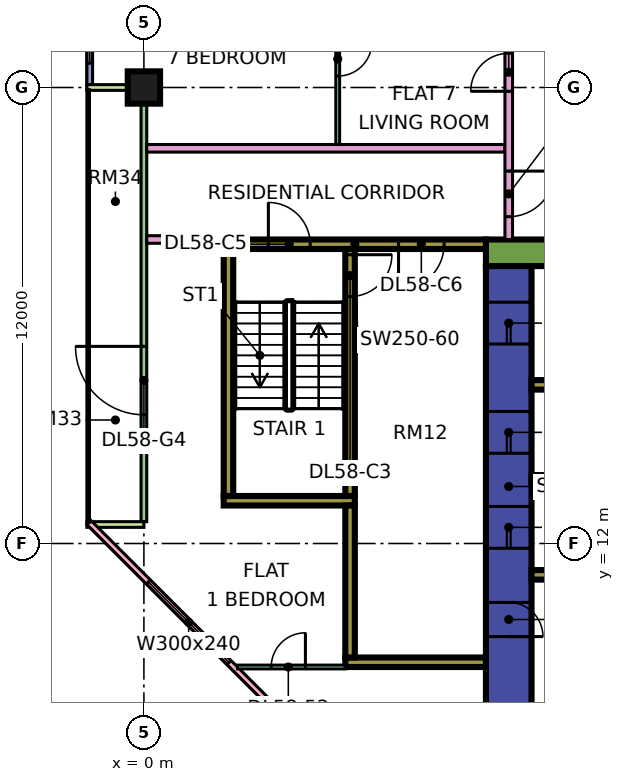
"""IFC4 building model, lengths in metres.
Left out: names, types, materials, properties, quantities, classifications, styles, units other than length and angle.
Written with IfcOpenShell. Run it as: python <this file> out.ifc"""

import sys

from ifc_helpers import new_model, si_unit, direction, frame, frame_2d, origin, origin_2d, place, context, subcontext, project, spatial, rectangle, extrude, element, fill, save


model = new_model("IFC4")
c1 = context("Model", 3, precision=1e-05, world=origin(), true_north=direction((0.0, 1.0)))
c2 = subcontext(c1, "Body", "Model", "MODEL_VIEW")
j1 = project(units=[si_unit("LENGTHUNIT", "METRE"), si_unit("PLANEANGLEUNIT", "RADIAN")], contexts=[c1])
p1 = place(None, origin())
s1 = spatial("IfcSite", under=j1, at=p1, CompositionType="ELEMENT")
p2 = place(p1, origin())
s2 = spatial("IfcBuilding", under=s1, at=p2, CompositionType="ELEMENT")
p3 = place(p2, frame((0.0, 0.0, 245.4)))
s3 = spatial("IfcBuildingStorey", under=s2, at=p3, CompositionType="ELEMENT", Elevation=245.4)
p4 = place(p3, frame((0.0, 24.0, 0.0), z_axis=(0.0, 0.0, 1.0), x_axis=(1.0, 0.0, 0.0)))
e1 = element("IfcColumn", 1, at=p4, inside=s3, PredefinedType="COLUMN", context=c2, shape_type="SweptSolid", body=[
    extrude(rectangle(XDim=0.85, YDim=0.85, at=origin_2d()), origin(), (0.0, 0.0, 1.0), 3.75),
])
p5 = place(p3, frame((9.0, 19.65, 0.0), z_axis=(0.0, 0.0, 1.0), x_axis=(1.0, 0.0, 0.0)))
e2 = element("IfcWall", 2, at=p5, inside=s3, PredefinedType="SHEAR", context=c2, shape_type="SweptSolid", body=[
    extrude(rectangle(XDim=25.0, YDim=0.7, at=frame_2d((12.5, 0.0))), origin(), (0.0, 0.0, 1.0), 3.75),
])
p6 = place(p5, frame((19.1, 0.0, 0.0)))
e3 = element("IfcOpeningElement", 3, at=p6, cuts=e2, PredefinedType="OPENING", context=c2, shape_type="SweptSolid", body=[
    extrude(rectangle(XDim=1.8, YDim=2.4, at=frame_2d((0.9, 1.2))), frame((0.0, 0.36, 0.0), z_axis=(0.0, -1.0, 0.0), x_axis=(1.0, 0.0, 0.0)), (0.0, 0.0, 1.0), 0.72),
])
p7 = place(p3, frame((9.6, 7.7, 0.0), z_axis=(0.0, 0.0, 1.0), x_axis=(0.0, 1.0, 0.0)))
e4 = element("IfcWall", 4, at=p7, inside=s3, PredefinedType="SHEAR", context=c2, shape_type="SweptSolid", body=[
    extrude(rectangle(XDim=11.6, YDim=1.2, at=frame_2d((5.8, 0.0))), origin(), (0.0, 0.0, 1.0), 3.75),
])
p8 = place(p7, frame((4.175, 0.0, 0.0)))
e5 = element("IfcOpeningElement", 5, at=p8, cuts=e4, PredefinedType="OPENING", context=c2, shape_type="SweptSolid", body=[
    extrude(rectangle(XDim=1.1, YDim=2.2, at=frame_2d((0.55, 1.1))), frame((0.0, 0.61, 0.0), z_axis=(0.0, -1.0, 0.0), x_axis=(1.0, 0.0, 0.0)), (0.0, 0.0, 1.0), 1.22),
])
p9 = place(p7, frame((6.675, 0.0, 0.0)))
e6 = element("IfcOpeningElement", 6, at=p9, cuts=e4, PredefinedType="OPENING", context=c2, shape_type="SweptSolid", body=[
    extrude(rectangle(XDim=1.1, YDim=2.2, at=frame_2d((0.55, 1.1))), frame((0.0, 0.61, 0.0), z_axis=(0.0, -1.0, 0.0), x_axis=(1.0, 0.0, 0.0)), (0.0, 0.0, 1.0), 1.22),
])
p10 = place(p7, frame((9.55, 0.0, 0.0)))
e7 = element("IfcOpeningElement", 7, at=p10, cuts=e4, PredefinedType="OPENING", context=c2, shape_type="SweptSolid", body=[
    extrude(rectangle(XDim=1.1, YDim=2.2, at=frame_2d((0.55, 1.1))), frame((0.0, 0.61, 0.0), z_axis=(0.0, -1.0, 0.0), x_axis=(1.0, 0.0, 0.0)), (0.0, 0.0, 1.0), 1.22),
])
p11 = place(p7, frame((1.85, 0.0, 0.0)))
e8 = element("IfcOpeningElement", 8, at=p11, cuts=e4, PredefinedType="OPENING", context=c2, shape_type="SweptSolid", body=[
    extrude(rectangle(XDim=0.9, YDim=2.1, at=frame_2d((0.45, 1.05))), frame((0.0, 0.61, 0.0), z_axis=(0.0, -1.0, 0.0), x_axis=(1.0, 0.0, 0.0)), (0.0, 0.0, 1.0), 1.22),
])
for number, where, z_axis, x_axis in (
    (9, (10.2, 11.175, 0.0), (0.0, 0.0, 1.0), (1.0, 0.0, 0.0)),
    (10, (10.2, 13.675, 0.0), (0.0, 0.0, 1.0), (1.0, 0.0, 0.0)),
    (11, (10.2, 16.175, 0.0), (0.0, 0.0, 1.0), (1.0, 0.0, 0.0)),
):
    element("IfcWall", number, at=place(p3, frame(where, z_axis=z_axis, x_axis=x_axis)), inside=s3, PredefinedType="SHEAR", context=c2, shape_type="SweptSolid", body=[
        extrude(rectangle(XDim=3.0, YDim=0.25, at=frame_2d((1.5, 0.0))), origin(), (0.0, 0.0, 1.0), 3.75),
    ])
p12 = place(p3, frame((2.1, 19.875, 0.0), z_axis=(0.0, 0.0, 1.0), x_axis=(1.0, 0.0, 0.0)))
e12 = element("IfcWall", 12, at=p12, inside=s3, PredefinedType="SHEAR", context=c2, shape_type="SweptSolid", body=[
    extrude(rectangle(XDim=6.9, YDim=0.25, at=frame_2d((3.45, 0.0))), origin(), (0.0, 0.0, 1.0), 3.75),
])
p13 = place(p12, frame((1.175, 0.0, 0.0)))
e13 = element("IfcOpeningElement", 13, at=p13, cuts=e12, PredefinedType="OPENING", context=c2, shape_type="SweptSolid", body=[
    extrude(rectangle(XDim=1.1, YDim=2.2, at=frame_2d((0.55, 1.1))), frame((0.0, 0.135, 0.0), z_axis=(0.0, -1.0, 0.0), x_axis=(1.0, 0.0, 0.0)), (0.0, 0.0, 1.0), 0.27),
])
p14 = place(p12, frame((4.6, 0.0, 0.0)))
e14 = element("IfcOpeningElement", 14, at=p14, cuts=e12, PredefinedType="OPENING", context=c2, shape_type="SweptSolid", body=[
    extrude(rectangle(XDim=1.2, YDim=2.2, at=frame_2d((0.6, 1.1))), frame((0.0, 0.135, 0.0), z_axis=(0.0, -1.0, 0.0), x_axis=(1.0, 0.0, 0.0)), (0.0, 0.0, 1.0), 0.27),
])
p15 = place(p3, frame((2.1, 13.125, 0.0), z_axis=(0.0, 0.0, 1.0), x_axis=(1.0, 0.0, 0.0)))
e15 = element("IfcWall", 15, at=p15, inside=s3, PredefinedType="SHEAR", context=c2, shape_type="SweptSolid", body=[
    extrude(rectangle(XDim=3.45, YDim=0.25, at=frame_2d((1.725, 0.0))), origin(), (0.0, 0.0, 1.0), 3.75),
])
p16 = place(p3, frame((2.225, 13.25, 0.0), z_axis=(0.0, 0.0, 1.0), x_axis=(0.0, 1.0, 0.0)))
e16 = element("IfcWall", 16, at=p16, inside=s3, PredefinedType="SHEAR", context=c2, shape_type="SweptSolid", body=[
    extrude(rectangle(XDim=6.5, YDim=0.25, at=frame_2d((3.25, 0.0))), origin(), (0.0, 0.0, 1.0), 3.75),
])
p17 = place(p3, frame((5.425, 13.25, 0.0), z_axis=(0.0, 0.0, 1.0), x_axis=(0.0, 1.0, 0.0)))
e17 = element("IfcWall", 17, at=p17, inside=s3, PredefinedType="SHEAR", context=c2, shape_type="SweptSolid", body=[
    extrude(rectangle(XDim=6.5, YDim=0.25, at=frame_2d((3.25, 0.0))), origin(), (0.0, 0.0, 1.0), 3.75),
])
p18 = place(p17, frame((5.25, 0.0, 0.0)))
e18 = element("IfcOpeningElement", 18, at=p18, cuts=e17, PredefinedType="OPENING", context=c2, shape_type="SweptSolid", body=[
    extrude(rectangle(XDim=1.1, YDim=2.2, at=frame_2d((0.55, 1.1))), frame((0.0, 0.135, 0.0), z_axis=(0.0, -1.0, 0.0), x_axis=(1.0, 0.0, 0.0)), (0.0, 0.0, 1.0), 0.27),
])
p19 = place(p3, frame((5.3, 8.875, 0.0), z_axis=(0.0, 0.0, 1.0), x_axis=(1.0, 0.0, 0.0)))
e19 = element("IfcWall", 19, at=p19, inside=s3, PredefinedType="SHEAR", context=c2, shape_type="SweptSolid", body=[
    extrude(rectangle(XDim=3.7, YDim=0.25, at=frame_2d((1.85, 0.0))), origin(), (0.0, 0.0, 1.0), 3.75),
])
p20 = place(p3, frame((5.425, 9.0, 0.0), z_axis=(0.0, 0.0, 1.0), x_axis=(0.0, 1.0, 0.0)))
e20 = element("IfcWall", 20, at=p20, inside=s3, PredefinedType="SHEAR", context=c2, shape_type="SweptSolid", body=[
    extrude(rectangle(XDim=4.0, YDim=0.25, at=frame_2d((2.0, 0.0))), origin(), (0.0, 0.0, 1.0), 3.75),
])
p21 = place(p3, frame((-1.425, 35.925, 0.0), z_axis=(0.0, 0.0, 1.0), x_axis=(0.0, -1.0, 0.0)))
e21 = element("IfcWall", 21, at=p21, inside=s3, PredefinedType="SOLIDWALL", context=c2, shape_type="SweptSolid", body=[
    extrude(rectangle(XDim=11.85, YDim=0.15, at=frame_2d((5.925, 0.0))), origin(), (0.0, 0.0, 1.0), 3.35),
])
p22 = place(p21, frame((0.562, 0.0, 0.45)))
e22 = element("IfcOpeningElement", 22, at=p22, cuts=e21, PredefinedType="OPENING", context=c2, shape_type="SweptSolid", body=[
    extrude(rectangle(XDim=1.8, YDim=2.4, at=frame_2d((0.9, 1.2))), frame((0.0, 0.085, 0.0), z_axis=(0.0, -1.0, 0.0), x_axis=(1.0, 0.0, 0.0)), (0.0, 0.0, 1.0), 0.17),
])
p23 = place(p21, frame((3.525, 0.0, 0.45)))
e23 = element("IfcOpeningElement", 23, at=p23, cuts=e21, PredefinedType="OPENING", context=c2, shape_type="SweptSolid", body=[
    extrude(rectangle(XDim=1.8, YDim=2.4, at=frame_2d((0.9, 1.2))), frame((0.0, 0.085, 0.0), z_axis=(0.0, -1.0, 0.0), x_axis=(1.0, 0.0, 0.0)), (0.0, 0.0, 1.0), 0.17),
])
p24 = place(p21, frame((6.525, 0.0, 0.45)))
e24 = element("IfcOpeningElement", 24, at=p24, cuts=e21, PredefinedType="OPENING", context=c2, shape_type="SweptSolid", body=[
    extrude(rectangle(XDim=1.8, YDim=2.4, at=frame_2d((0.9, 1.2))), frame((0.0, 0.085, 0.0), z_axis=(0.0, -1.0, 0.0), x_axis=(1.0, 0.0, 0.0)), (0.0, 0.0, 1.0), 0.17),
])
p25 = place(p21, frame((9.488, 0.0, 0.45)))
e25 = element("IfcOpeningElement", 25, at=p25, cuts=e21, PredefinedType="OPENING", context=c2, shape_type="SweptSolid", body=[
    extrude(rectangle(XDim=1.8, YDim=2.4, at=frame_2d((0.9, 1.2))), frame((0.0, 0.085, 0.0), z_axis=(0.0, -1.0, 0.0), x_axis=(1.0, 0.0, 0.0)), (0.0, 0.0, 1.0), 0.17),
])
p26 = place(p3, frame((0.0, 23.925, 0.0), z_axis=(0.0, 0.0, 1.0), x_axis=(0.0, -1.0, 0.0)))
e26 = element("IfcWall", 26, at=p26, inside=s3, PredefinedType="SOLIDWALL", context=c2, shape_type="SweptSolid", body=[
    extrude(rectangle(XDim=11.35, YDim=0.15, at=frame_2d((5.675, 0.0))), origin(), (0.0, 0.0, 1.0), 3.35),
])
p27 = place(p26, frame((6.738, 0.0, 0.0)))
e27 = element("IfcOpeningElement", 27, at=p27, cuts=e26, PredefinedType="OPENING", context=c2, shape_type="SweptSolid", body=[
    extrude(rectangle(XDim=1.8, YDim=2.4, at=frame_2d((0.9, 1.2))), frame((0.0, 0.085, 0.0), z_axis=(0.0, -1.0, 0.0), x_axis=(1.0, 0.0, 0.0)), (0.0, 0.0, 1.0), 0.17),
])
for number, where, z_axis, x_axis in (
    (28, (-1.5, 24.0, 0.0), (0.0, 0.0, 1.0), (1.0, 0.0, 0.0)),
    (29, (-1.5, 12.5, 0.0), (0.0, 0.0, 1.0), (1.0, 0.0, 0.0)),
):
    element("IfcWall", number, at=place(p3, frame(where, z_axis=z_axis, x_axis=x_axis)), inside=s3, PredefinedType="SOLIDWALL", context=c2, shape_type="SweptSolid", body=[
        extrude(rectangle(XDim=1.5, YDim=0.15, at=frame_2d((0.75, 0.0))), origin(), (0.0, 0.0, 1.0), 3.35),
    ])
p28 = place(p3, frame((-1.447, 12.553, 0.0), z_axis=(0.0, 0.0, 1.0), x_axis=(0.707106781187, -0.707106781187, 0.0)))
e30 = element("IfcWall", 30, at=p28, inside=s3, PredefinedType="SOLIDWALL", context=c2, shape_type="SweptSolid", body=[
    extrude(rectangle(XDim=19.799, YDim=0.15, at=frame_2d((9.899, 0.0))), origin(), (0.0, 0.0, 1.0), 3.35),
])
p29 = place(p28, frame((2.212, 0.0, 0.45)))
e31 = element("IfcOpeningElement", 31, at=p29, cuts=e30, PredefinedType="OPENING", context=c2, shape_type="SweptSolid", body=[
    extrude(rectangle(XDim=3.0, YDim=2.4, at=frame_2d((1.5, 1.2))), frame((0.0, 0.085, 0.0), z_axis=(0.0, -1.0, 0.0), x_axis=(1.0, 0.0, 0.0)), (0.0, 0.0, 1.0), 0.17),
])
p30 = place(p28, frame((10.216, 0.0, 0.45)))
e32 = element("IfcOpeningElement", 32, at=p30, cuts=e30, PredefinedType="OPENING", context=c2, shape_type="SweptSolid", body=[
    extrude(rectangle(XDim=3.0, YDim=2.4, at=frame_2d((1.5, 1.2))), frame((0.0, 0.085, 0.0), z_axis=(0.0, -1.0, 0.0), x_axis=(1.0, 0.0, 0.0)), (0.0, 0.0, 1.0), 0.17),
])
p31 = place(p3, frame((0.074, 20.0, 0.0), z_axis=(0.0, 0.0, 1.0), x_axis=(1.0, 0.0, 0.0)))
e33 = element("IfcWall", 33, at=p31, inside=s3, PredefinedType="PARTITIONING", context=c2, shape_type="SweptSolid", body=[
    extrude(rectangle(XDim=2.026, YDim=0.2, at=frame_2d((1.013, 0.0))), origin(), (0.0, 0.0, 1.0), 3.35),
])
p32 = place(p3, frame((0.074, 22.4, 0.0), z_axis=(0.0, 0.0, 1.0), x_axis=(1.0, 0.0, 0.0)))
e34 = element("IfcWall", 34, at=p32, inside=s3, PredefinedType="PARTITIONING", context=c2, shape_type="SweptSolid", body=[
    extrude(rectangle(XDim=9.426, YDim=0.2, at=frame_2d((4.713, 0.0))), origin(), (0.0, 0.0, 1.0), 3.35),
])
p33 = place(p3, frame((2.461, 8.75, 0.0), z_axis=(0.0, 0.0, 1.0), x_axis=(1.0, 0.0, 0.0)))
e35 = element("IfcWall", 35, at=p33, inside=s3, PredefinedType="PARTITIONING", context=c2, shape_type="SweptSolid", body=[
    extrude(rectangle(XDim=2.839, YDim=0.1, at=frame_2d((1.419, 0.0))), origin(), (0.0, 0.0, 1.0), 3.35),
])
p34 = place(p33, frame((0.889, 0.0, 0.0)))
e36 = element("IfcOpeningElement", 36, at=p34, cuts=e35, PredefinedType="OPENING", context=c2, shape_type="SweptSolid", body=[
    extrude(rectangle(XDim=0.9, YDim=2.1, at=frame_2d((0.45, 1.05))), frame((0.0, 0.06, 0.0), z_axis=(0.0, -1.0, 0.0), x_axis=(1.0, 0.0, 0.0)), (0.0, 0.0, 1.0), 0.12),
])
p35 = place(p3, frame((5.1, 22.5, 0.0), z_axis=(0.0, 0.0, 1.0), x_axis=(0.0, 1.0, 0.0)))
e37 = element("IfcWall", 37, at=p35, inside=s3, PredefinedType="PARTITIONING", context=c2, shape_type="SweptSolid", body=[
    extrude(rectangle(XDim=10.55, YDim=0.1, at=frame_2d((5.275, 0.0))), origin(), (0.0, 0.0, 1.0), 3.35),
])
p36 = place(p35, frame((1.8, 0.0, 0.0)))
e38 = element("IfcOpeningElement", 38, at=p36, cuts=e37, PredefinedType="OPENING", context=c2, shape_type="SweptSolid", body=[
    extrude(rectangle(XDim=0.9, YDim=2.1, at=frame_2d((0.45, 1.05))), frame((0.0, 0.06, 0.0), z_axis=(0.0, -1.0, 0.0), x_axis=(1.0, 0.0, 0.0)), (0.0, 0.0, 1.0), 0.12),
])
p37 = place(p35, frame((5.55, 0.0, 0.0)))
e39 = element("IfcOpeningElement", 39, at=p37, cuts=e37, PredefinedType="OPENING", context=c2, shape_type="SweptSolid", body=[
    extrude(rectangle(XDim=0.9, YDim=2.1, at=frame_2d((0.45, 1.05))), frame((0.0, 0.06, 0.0), z_axis=(0.0, -1.0, 0.0), x_axis=(1.0, 0.0, 0.0)), (0.0, 0.0, 1.0), 0.12),
])
p38 = place(p35, frame((8.55, 0.0, 0.0)))
e40 = element("IfcOpeningElement", 40, at=p38, cuts=e37, PredefinedType="OPENING", context=c2, shape_type="SweptSolid", body=[
    extrude(rectangle(XDim=0.9, YDim=2.1, at=frame_2d((0.45, 1.05))), frame((0.0, 0.06, 0.0), z_axis=(0.0, -1.0, 0.0), x_axis=(1.0, 0.0, 0.0)), (0.0, 0.0, 1.0), 0.12),
])
p39 = place(p3, frame((9.6, 20.0, 0.0), z_axis=(0.0, 0.0, 1.0), x_axis=(0.0, 1.0, 0.0)))
e41 = element("IfcWall", 41, at=p39, inside=s3, PredefinedType="PARTITIONING", context=c2, shape_type="SweptSolid", body=[
    extrude(rectangle(XDim=44.35, YDim=0.2, at=frame_2d((22.175, 0.0))), origin(), (0.0, 0.0, 1.0), 3.35),
])
p40 = place(p39, frame((28.8, 0.0, 0.0)))
e42 = element("IfcOpeningElement", 42, at=p40, cuts=e41, PredefinedType="OPENING", context=c2, shape_type="SweptSolid", body=[
    extrude(rectangle(XDim=1.0, YDim=2.1, at=frame_2d((0.5, 1.05))), frame((0.0, 0.11, 0.0), z_axis=(0.0, -1.0, 0.0), x_axis=(1.0, 0.0, 0.0)), (0.0, 0.0, 1.0), 0.22),
])
p41 = place(p39, frame((0.6, 0.0, 0.0)))
e43 = element("IfcOpeningElement", 43, at=p41, cuts=e41, PredefinedType="OPENING", context=c2, shape_type="SweptSolid", body=[
    extrude(rectangle(XDim=1.2, YDim=2.1, at=frame_2d((0.6, 1.05))), frame((0.0, 0.11, 0.0), z_axis=(0.0, -1.0, 0.0), x_axis=(1.0, 0.0, 0.0)), (0.0, 0.0, 1.0), 0.22),
])
p42 = place(p39, frame((3.9, 0.0, 0.0)))
e44 = element("IfcOpeningElement", 44, at=p42, cuts=e41, PredefinedType="OPENING", context=c2, shape_type="SweptSolid", body=[
    extrude(rectangle(XDim=1.0, YDim=2.1, at=frame_2d((0.5, 1.05))), frame((0.0, 0.11, 0.0), z_axis=(0.0, -1.0, 0.0), x_axis=(1.0, 0.0, 0.0)), (0.0, 0.0, 1.0), 0.22),
])
p43 = place(p25, origin())
e45 = element("IfcWindow", 45, at=p43, inside=s3, PartitioningType="SINGLE_PANEL", PredefinedType="WINDOW", context=c2, shape_type="SweptSolid", body=[
    extrude(rectangle(XDim=1.8, YDim=2.4, at=frame_2d((0.9, 1.2))), frame((0.0, 0.03, 0.0), z_axis=(0.0, -1.0, 0.0), x_axis=(1.0, 0.0, 0.0)), (0.0, 0.0, 1.0), 0.06),
])
fill(e25, e45)
p44 = place(p27, frame((1.8, 0.0, 0.0), z_axis=(0.0, 0.0, 1.0), x_axis=(-1.0, 0.0, 0.0)))
e46 = element("IfcDoor", 46, at=p44, inside=s3, OperationType="DOUBLE_DOOR_SINGLE_SWING", PredefinedType="DOOR", context=c2, shape_type="SweptSolid", body=[
    extrude(rectangle(XDim=1.8, YDim=2.4, at=frame_2d((0.9, 1.2))), frame((0.0, 0.025, 0.0), z_axis=(0.0, -1.0, 0.0), x_axis=(1.0, 0.0, 0.0)), (0.0, 0.0, 1.0), 0.05),
])
fill(e27, e46)
p45 = place(p29, origin())
e47 = element("IfcWindow", 47, at=p45, inside=s3, PartitioningType="SINGLE_PANEL", PredefinedType="WINDOW", context=c2, shape_type="SweptSolid", body=[
    extrude(rectangle(XDim=3.0, YDim=2.4, at=frame_2d((1.5, 1.2))), frame((0.0, 0.03, 0.0), z_axis=(0.0, -1.0, 0.0), x_axis=(1.0, 0.0, 0.0)), (0.0, 0.0, 1.0), 0.06),
])
fill(e31, e47)
p46 = place(p8, origin())
e48 = element("IfcDoor", 48, at=p46, inside=s3, OperationType="DOUBLE_DOOR_SLIDING", PredefinedType="DOOR", context=c2, shape_type="SweptSolid", body=[
    extrude(rectangle(XDim=1.1, YDim=2.2, at=frame_2d((0.55, 1.1))), frame((0.0, 0.025, 0.0), z_axis=(0.0, -1.0, 0.0), x_axis=(1.0, 0.0, 0.0)), (0.0, 0.0, 1.0), 0.05),
])
fill(e5, e48)
p47 = place(p9, origin())
e49 = element("IfcDoor", 49, at=p47, inside=s3, OperationType="DOUBLE_DOOR_SLIDING", PredefinedType="DOOR", context=c2, shape_type="SweptSolid", body=[
    extrude(rectangle(XDim=1.1, YDim=2.2, at=frame_2d((0.55, 1.1))), frame((0.0, 0.025, 0.0), z_axis=(0.0, -1.0, 0.0), x_axis=(1.0, 0.0, 0.0)), (0.0, 0.0, 1.0), 0.05),
])
fill(e6, e49)
p48 = place(p10, origin())
e50 = element("IfcDoor", 50, at=p48, inside=s3, OperationType="DOUBLE_DOOR_SLIDING", PredefinedType="DOOR", context=c2, shape_type="SweptSolid", body=[
    extrude(rectangle(XDim=1.1, YDim=2.2, at=frame_2d((0.55, 1.1))), frame((0.0, 0.025, 0.0), z_axis=(0.0, -1.0, 0.0), x_axis=(1.0, 0.0, 0.0)), (0.0, 0.0, 1.0), 0.05),
])
fill(e7, e50)
p49 = place(p18, origin())
e51 = element("IfcDoor", 51, at=p49, inside=s3, OperationType="SINGLE_SWING_RIGHT", PredefinedType="DOOR", context=c2, shape_type="SweptSolid", body=[
    extrude(rectangle(XDim=1.1, YDim=2.2, at=frame_2d((0.55, 1.1))), frame((0.0, 0.025, 0.0), z_axis=(0.0, -1.0, 0.0), x_axis=(1.0, 0.0, 0.0)), (0.0, 0.0, 1.0), 0.05),
])
fill(e18, e51)
p50 = place(p11, frame((0.9, 0.0, 0.0), z_axis=(0.0, 0.0, 1.0), x_axis=(-1.0, 0.0, 0.0)))
e52 = element("IfcDoor", 52, at=p50, inside=s3, OperationType="SINGLE_SWING_LEFT", PredefinedType="DOOR", context=c2, shape_type="SweptSolid", body=[
    extrude(rectangle(XDim=0.9, YDim=2.1, at=frame_2d((0.45, 1.05))), frame((0.0, 0.025, 0.0), z_axis=(0.0, -1.0, 0.0), x_axis=(1.0, 0.0, 0.0)), (0.0, 0.0, 1.0), 0.05),
])
fill(e8, e52)
p51 = place(p13, origin())
e53 = element("IfcDoor", 53, at=p51, inside=s3, OperationType="SINGLE_SWING_LEFT", PredefinedType="DOOR", context=c2, shape_type="SweptSolid", body=[
    extrude(rectangle(XDim=1.1, YDim=2.2, at=frame_2d((0.55, 1.1))), frame((0.0, 0.025, 0.0), z_axis=(0.0, -1.0, 0.0), x_axis=(1.0, 0.0, 0.0)), (0.0, 0.0, 1.0), 0.05),
])
fill(e13, e53)
p52 = place(p14, frame((1.2, 0.0, 0.0), z_axis=(0.0, 0.0, 1.0), x_axis=(-1.0, 0.0, 0.0)))
e54 = element("IfcDoor", 54, at=p52, inside=s3, OperationType="SINGLE_SWING_LEFT", PredefinedType="DOOR", context=c2, shape_type="SweptSolid", body=[
    extrude(rectangle(XDim=1.2, YDim=2.2, at=frame_2d((0.6, 1.1))), frame((0.0, 0.025, 0.0), z_axis=(0.0, -1.0, 0.0), x_axis=(1.0, 0.0, 0.0)), (0.0, 0.0, 1.0), 0.05),
])
fill(e14, e54)
p53 = place(p41, origin())
e55 = element("IfcDoor", 55, at=p53, inside=s3, OperationType="SINGLE_SWING_RIGHT", PredefinedType="DOOR", context=c2, shape_type="SweptSolid", body=[
    extrude(rectangle(XDim=1.2, YDim=2.1, at=frame_2d((0.6, 1.05))), frame((0.0, 0.025, 0.0), z_axis=(0.0, -1.0, 0.0), x_axis=(1.0, 0.0, 0.0)), (0.0, 0.0, 1.0), 0.05),
])
fill(e43, e55)
p54 = place(p34, frame((0.9, 0.0, 0.0), z_axis=(0.0, 0.0, 1.0), x_axis=(-1.0, 0.0, 0.0)))
e56 = element("IfcDoor", 56, at=p54, inside=s3, OperationType="SINGLE_SWING_RIGHT", PredefinedType="DOOR", context=c2, shape_type="SweptSolid", body=[
    extrude(rectangle(XDim=0.9, YDim=2.1, at=frame_2d((0.45, 1.05))), frame((0.0, 0.025, 0.0), z_axis=(0.0, -1.0, 0.0), x_axis=(1.0, 0.0, 0.0)), (0.0, 0.0, 1.0), 0.05),
])
fill(e36, e56)
p55 = place(p36, origin())
e57 = element("IfcDoor", 57, at=p55, inside=s3, OperationType="SINGLE_SWING_RIGHT", PredefinedType="DOOR", context=c2, shape_type="SweptSolid", body=[
    extrude(rectangle(XDim=0.9, YDim=2.1, at=frame_2d((0.45, 1.05))), frame((0.0, 0.025, 0.0), z_axis=(0.0, -1.0, 0.0), x_axis=(1.0, 0.0, 0.0)), (0.0, 0.0, 1.0), 0.05),
])
fill(e38, e57)
p56 = place(p42, origin())
e58 = element("IfcDoor", 58, at=p56, inside=s3, OperationType="SINGLE_SWING_LEFT", PredefinedType="DOOR", context=c2, shape_type="SweptSolid", body=[
    extrude(rectangle(XDim=1.0, YDim=2.1, at=frame_2d((0.5, 1.05))), frame((0.0, 0.025, 0.0), z_axis=(0.0, -1.0, 0.0), x_axis=(1.0, 0.0, 0.0)), (0.0, 0.0, 1.0), 0.05),
])
fill(e44, e58)
save(model, sys.argv[1])
